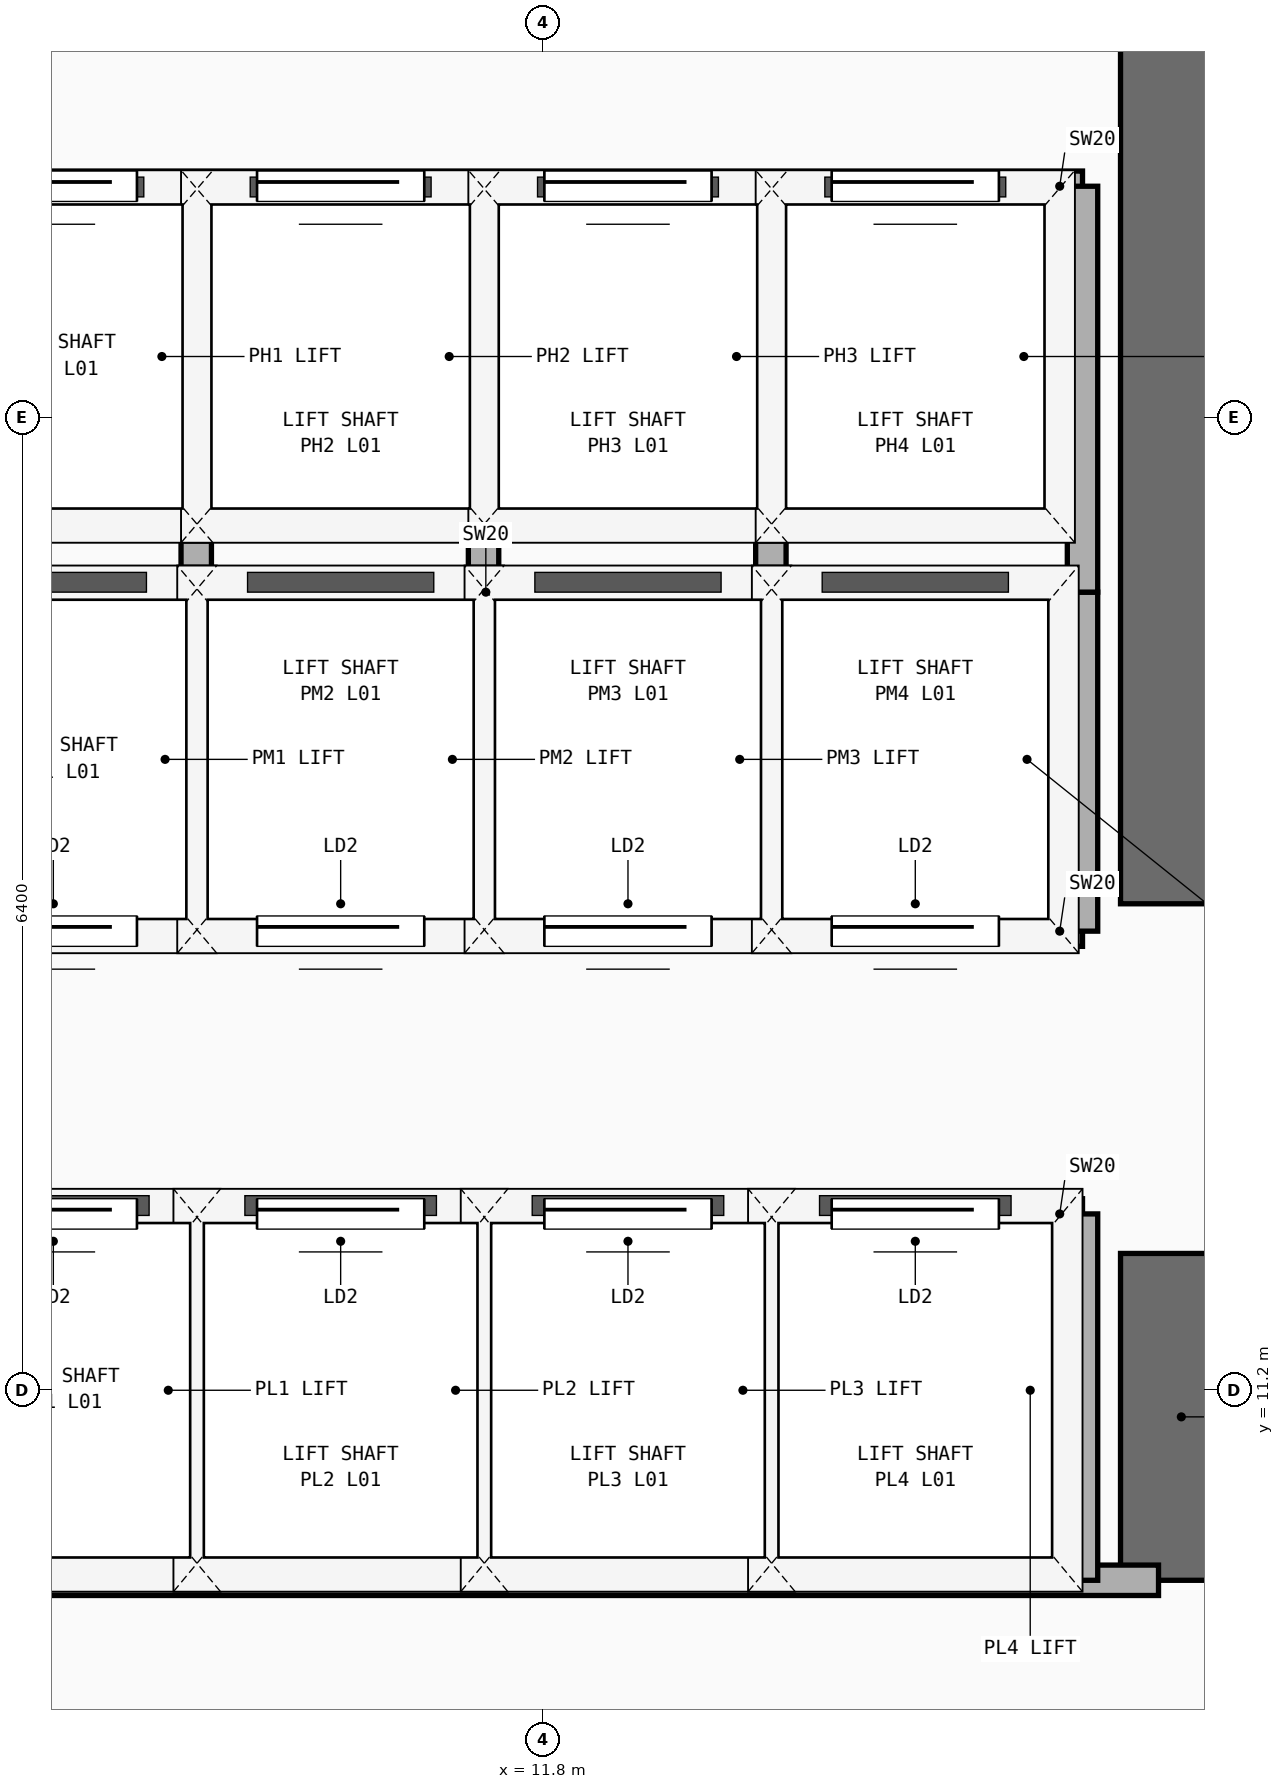
"""IFC4 building model, lengths in metres.
Left out: names, types, materials, properties, quantities, classifications, styles, units other than length and angle.
Written with IfcOpenShell. Run it as: python <this file> out.ifc"""

import sys

from ifc_helpers import new_model, si_unit, direction, frame, frame_2d, origin, place, context, subcontext, project, spatial, rectangle, extrude, element, fill, save


model = new_model("IFC4")
c1 = context("Model", 3, precision=1e-05, world=origin(), true_north=direction((0.0, 1.0)))
c2 = subcontext(c1, "Body", "Model", "MODEL_VIEW")
j1 = project(units=[si_unit("LENGTHUNIT", "METRE"), si_unit("PLANEANGLEUNIT", "RADIAN")], contexts=[c1])
p1 = place(None, origin())
s1 = spatial("IfcSite", under=j1, at=p1, CompositionType="ELEMENT")
p2 = place(p1, origin())
s2 = spatial("IfcBuilding", under=s1, at=p2, CompositionType="ELEMENT")
p3 = place(p2, origin())
s3 = spatial("IfcBuildingStorey", under=s2, at=p3, CompositionType="ELEMENT", Elevation=0.0)
p4 = place(p3, frame((16.0, 9.95, 0.0), z_axis=(0.0, 0.0, 1.0), x_axis=(0.0, 1.0, 0.0)))
e1 = element("IfcWall", 1, at=p4, inside=s3, PredefinedType="SHEAR", context=c2, shape_type="SweptSolid", body=[
    extrude(rectangle(XDim=2.15, YDim=0.8, at=frame_2d((1.075, 0.0))), origin(), (0.0, 0.0, 1.0), 5.26),
])
p5 = place(p3, frame((16.0, 14.4, 0.0), z_axis=(0.0, 0.0, 1.0), x_axis=(0.0, 1.0, 0.0)))
e2 = element("IfcWall", 2, at=p5, inside=s3, PredefinedType="SHEAR", context=c2, shape_type="SweptSolid", body=[
    extrude(rectangle(XDim=9.1, YDim=0.8, at=frame_2d((4.55, 0.0))), origin(), (0.0, 0.0, 1.0), 5.26),
])
p6 = place(p3, frame((7.5, 9.95, 0.0), z_axis=(0.0, 0.0, 1.0), x_axis=(1.0, 0.0, 0.0)))
e3 = element("IfcWall", 3, at=p6, inside=s3, PredefinedType="PARTITIONING", context=c2, shape_type="SweptSolid", body=[
    extrude(rectangle(XDim=8.35, YDim=0.2, at=frame_2d((4.175, 0.0))), origin(), (0.0, 0.0, 1.0), 5.26),
])
p7 = place(p3, frame((7.5, 12.36, 0.0), z_axis=(0.0, 0.0, 1.0), x_axis=(1.0, 0.0, 0.0)))
e4 = element("IfcWall", 4, at=p7, inside=s3, PredefinedType="PARTITIONING", context=c2, shape_type="SweptSolid", body=[
    extrude(rectangle(XDim=7.85, YDim=0.2, at=frame_2d((3.925, 0.0))), origin(), (0.0, 0.0, 1.0), 5.26),
])
p8 = place(p7, frame((0.53, 0.0, 0.0)))
e5 = element("IfcOpeningElement", 5, at=p8, cuts=e4, PredefinedType="OPENING", context=c2, shape_type="SweptSolid", body=[
    extrude(rectangle(XDim=1.1, YDim=2.2, at=frame_2d((0.55, 1.1))), frame((0.0, 0.11, 0.0), z_axis=(0.0, -1.0, 0.0), x_axis=(1.0, 0.0, 0.0)), (0.0, 0.0, 1.0), 0.22),
])
p9 = place(p7, frame((2.42, 0.0, 0.0)))
e6 = element("IfcOpeningElement", 6, at=p9, cuts=e4, PredefinedType="OPENING", context=c2, shape_type="SweptSolid", body=[
    extrude(rectangle(XDim=1.1, YDim=2.2, at=frame_2d((0.55, 1.1))), frame((0.0, 0.11, 0.0), z_axis=(0.0, -1.0, 0.0), x_axis=(1.0, 0.0, 0.0)), (0.0, 0.0, 1.0), 0.22),
])
p10 = place(p7, frame((4.31, 0.0, 0.0)))
e7 = element("IfcOpeningElement", 7, at=p10, cuts=e4, PredefinedType="OPENING", context=c2, shape_type="SweptSolid", body=[
    extrude(rectangle(XDim=1.1, YDim=2.2, at=frame_2d((0.55, 1.1))), frame((0.0, 0.11, 0.0), z_axis=(0.0, -1.0, 0.0), x_axis=(1.0, 0.0, 0.0)), (0.0, 0.0, 1.0), 0.22),
])
p11 = place(p7, frame((6.2, 0.0, 0.0)))
e8 = element("IfcOpeningElement", 8, at=p11, cuts=e4, PredefinedType="OPENING", context=c2, shape_type="SweptSolid", body=[
    extrude(rectangle(XDim=1.1, YDim=2.2, at=frame_2d((0.55, 1.1))), frame((0.0, 0.11, 0.0), z_axis=(0.0, -1.0, 0.0), x_axis=(1.0, 0.0, 0.0)), (0.0, 0.0, 1.0), 0.22),
])
for number, where, z_axis, x_axis in (
    (9, (15.35, 9.95, 0.0), (0.0, 0.0, 1.0), (0.0, 1.0, 0.0)),
    (10, (9.52, 9.95, 0.0), (0.0, 0.0, 1.0), (0.0, 1.0, 0.0)),
    (11, (11.41, 9.95, 0.0), (0.0, 0.0, 1.0), (0.0, 1.0, 0.0)),
    (12, (13.3, 9.95, 0.0), (0.0, 0.0, 1.0), (0.0, 1.0, 0.0)),
):
    element("IfcWall", number, at=place(p3, frame(where, z_axis=z_axis, x_axis=x_axis)), inside=s3, PredefinedType="PARTITIONING", context=c2, shape_type="SweptSolid", body=[
        extrude(rectangle(XDim=2.41, YDim=0.2, at=frame_2d((1.205, 0.0))), origin(), (0.0, 0.0, 1.0), 5.26),
    ])
p12 = place(p3, frame((7.5, 14.22, 0.0), z_axis=(0.0, 0.0, 1.0), x_axis=(1.0, 0.0, 0.0)))
e13 = element("IfcWall", 13, at=p12, inside=s3, PredefinedType="PARTITIONING", context=c2, shape_type="SweptSolid", body=[
    extrude(rectangle(XDim=7.85, YDim=0.2, at=frame_2d((3.925, 0.0))), origin(), (0.0, 0.0, 1.0), 5.26),
])
p13 = place(p12, frame((0.53, 0.0, 0.0)))
e14 = element("IfcOpeningElement", 14, at=p13, cuts=e13, PredefinedType="OPENING", context=c2, shape_type="SweptSolid", body=[
    extrude(rectangle(XDim=1.1, YDim=2.2, at=frame_2d((0.55, 1.1))), frame((0.0, 0.11, 0.0), z_axis=(0.0, -1.0, 0.0), x_axis=(1.0, 0.0, 0.0)), (0.0, 0.0, 1.0), 0.22),
])
p14 = place(p12, frame((2.42, 0.0, 0.0)))
e15 = element("IfcOpeningElement", 15, at=p14, cuts=e13, PredefinedType="OPENING", context=c2, shape_type="SweptSolid", body=[
    extrude(rectangle(XDim=1.1, YDim=2.2, at=frame_2d((0.55, 1.1))), frame((0.0, 0.11, 0.0), z_axis=(0.0, -1.0, 0.0), x_axis=(1.0, 0.0, 0.0)), (0.0, 0.0, 1.0), 0.22),
])
p15 = place(p12, frame((4.31, 0.0, 0.0)))
e16 = element("IfcOpeningElement", 16, at=p15, cuts=e13, PredefinedType="OPENING", context=c2, shape_type="SweptSolid", body=[
    extrude(rectangle(XDim=1.1, YDim=2.2, at=frame_2d((0.55, 1.1))), frame((0.0, 0.11, 0.0), z_axis=(0.0, -1.0, 0.0), x_axis=(1.0, 0.0, 0.0)), (0.0, 0.0, 1.0), 0.22),
])
p16 = place(p12, frame((6.2, 0.0, 0.0)))
e17 = element("IfcOpeningElement", 17, at=p16, cuts=e13, PredefinedType="OPENING", context=c2, shape_type="SweptSolid", body=[
    extrude(rectangle(XDim=1.1, YDim=2.2, at=frame_2d((0.55, 1.1))), frame((0.0, 0.11, 0.0), z_axis=(0.0, -1.0, 0.0), x_axis=(1.0, 0.0, 0.0)), (0.0, 0.0, 1.0), 0.22),
])
p17 = place(p3, frame((7.5, 16.45, 0.0), z_axis=(0.0, 0.0, 1.0), x_axis=(1.0, 0.0, 0.0)))
e18 = element("IfcWall", 18, at=p17, inside=s3, PredefinedType="PARTITIONING", context=c2, shape_type="SweptSolid", body=[
    extrude(rectangle(XDim=7.85, YDim=0.2, at=frame_2d((3.925, 0.0))), origin(), (0.0, 0.0, 1.0), 5.26),
])
for number, where, z_axis, x_axis in (
    (19, (15.35, 14.22, 0.0), (0.0, 0.0, 1.0), (0.0, 1.0, 0.0)),
    (20, (9.52, 14.22, 0.0), (0.0, 0.0, 1.0), (0.0, 1.0, 0.0)),
    (21, (11.41, 14.22, 0.0), (0.0, 0.0, 1.0), (0.0, 1.0, 0.0)),
    (22, (13.3, 14.22, 0.0), (0.0, 0.0, 1.0), (0.0, 1.0, 0.0)),
):
    element("IfcWall", number, at=place(p3, frame(where, z_axis=z_axis, x_axis=x_axis)), inside=s3, PredefinedType="PARTITIONING", context=c2, shape_type="SweptSolid", body=[
        extrude(rectangle(XDim=2.23, YDim=0.2, at=frame_2d((1.115, 0.0))), origin(), (0.0, 0.0, 1.0), 5.26),
    ])
p18 = place(p3, frame((7.5, 19.12, 0.0), z_axis=(0.0, 0.0, 1.0), x_axis=(1.0, 0.0, 0.0)))
e23 = element("IfcWall", 23, at=p18, inside=s3, PredefinedType="PARTITIONING", context=c2, shape_type="SweptSolid", body=[
    extrude(rectangle(XDim=7.85, YDim=0.2, at=frame_2d((3.925, 0.0))), origin(), (0.0, 0.0, 1.0), 5.26),
])
p19 = place(p18, frame((0.53, 0.0, 0.0)))
e24 = element("IfcOpeningElement", 24, at=p19, cuts=e23, PredefinedType="OPENING", context=c2, shape_type="SweptSolid", body=[
    extrude(rectangle(XDim=1.1, YDim=2.2, at=frame_2d((0.55, 1.1))), frame((0.0, 0.11, 0.0), z_axis=(0.0, -1.0, 0.0), x_axis=(1.0, 0.0, 0.0)), (0.0, 0.0, 1.0), 0.22),
])
p20 = place(p18, frame((2.42, 0.0, 0.0)))
e25 = element("IfcOpeningElement", 25, at=p20, cuts=e23, PredefinedType="OPENING", context=c2, shape_type="SweptSolid", body=[
    extrude(rectangle(XDim=1.1, YDim=2.2, at=frame_2d((0.55, 1.1))), frame((0.0, 0.11, 0.0), z_axis=(0.0, -1.0, 0.0), x_axis=(1.0, 0.0, 0.0)), (0.0, 0.0, 1.0), 0.22),
])
p21 = place(p18, frame((4.31, 0.0, 0.0)))
e26 = element("IfcOpeningElement", 26, at=p21, cuts=e23, PredefinedType="OPENING", context=c2, shape_type="SweptSolid", body=[
    extrude(rectangle(XDim=1.1, YDim=2.2, at=frame_2d((0.55, 1.1))), frame((0.0, 0.11, 0.0), z_axis=(0.0, -1.0, 0.0), x_axis=(1.0, 0.0, 0.0)), (0.0, 0.0, 1.0), 0.22),
])
p22 = place(p18, frame((6.2, 0.0, 0.0)))
e27 = element("IfcOpeningElement", 27, at=p22, cuts=e23, PredefinedType="OPENING", context=c2, shape_type="SweptSolid", body=[
    extrude(rectangle(XDim=1.1, YDim=2.2, at=frame_2d((0.55, 1.1))), frame((0.0, 0.11, 0.0), z_axis=(0.0, -1.0, 0.0), x_axis=(1.0, 0.0, 0.0)), (0.0, 0.0, 1.0), 0.22),
])
for number, where, z_axis, x_axis in (
    (28, (15.35, 16.45, 0.0), (0.0, 0.0, 1.0), (0.0, 1.0, 0.0)),
    (29, (9.52, 16.45, 0.0), (0.0, 0.0, 1.0), (0.0, 1.0, 0.0)),
    (30, (11.41, 16.45, 0.0), (0.0, 0.0, 1.0), (0.0, 1.0, 0.0)),
    (31, (13.3, 16.45, 0.0), (0.0, 0.0, 1.0), (0.0, 1.0, 0.0)),
):
    element("IfcWall", number, at=place(p3, frame(where, z_axis=z_axis, x_axis=x_axis)), inside=s3, PredefinedType="PARTITIONING", context=c2, shape_type="SweptSolid", body=[
        extrude(rectangle(XDim=2.67, YDim=0.2, at=frame_2d((1.335, 0.0))), origin(), (0.0, 0.0, 1.0), 5.26),
    ])
p23 = place(p8, origin())
e32 = element("IfcDoor", 32, at=p23, inside=s3, OperationType="SLIDING_TO_LEFT", PredefinedType="DOOR", context=c2, shape_type="SweptSolid", body=[
    extrude(rectangle(XDim=1.1, YDim=2.2, at=frame_2d((0.55, 1.1))), frame((0.0, 0.025, 0.0), z_axis=(0.0, -1.0, 0.0), x_axis=(1.0, 0.0, 0.0)), (0.0, 0.0, 1.0), 0.05),
])
fill(e5, e32)
p24 = place(p9, origin())
e33 = element("IfcDoor", 33, at=p24, inside=s3, OperationType="SLIDING_TO_LEFT", PredefinedType="DOOR", context=c2, shape_type="SweptSolid", body=[
    extrude(rectangle(XDim=1.1, YDim=2.2, at=frame_2d((0.55, 1.1))), frame((0.0, 0.025, 0.0), z_axis=(0.0, -1.0, 0.0), x_axis=(1.0, 0.0, 0.0)), (0.0, 0.0, 1.0), 0.05),
])
fill(e6, e33)
p25 = place(p10, origin())
e34 = element("IfcDoor", 34, at=p25, inside=s3, OperationType="SLIDING_TO_LEFT", PredefinedType="DOOR", context=c2, shape_type="SweptSolid", body=[
    extrude(rectangle(XDim=1.1, YDim=2.2, at=frame_2d((0.55, 1.1))), frame((0.0, 0.025, 0.0), z_axis=(0.0, -1.0, 0.0), x_axis=(1.0, 0.0, 0.0)), (0.0, 0.0, 1.0), 0.05),
])
fill(e7, e34)
p26 = place(p11, origin())
e35 = element("IfcDoor", 35, at=p26, inside=s3, OperationType="SLIDING_TO_LEFT", PredefinedType="DOOR", context=c2, shape_type="SweptSolid", body=[
    extrude(rectangle(XDim=1.1, YDim=2.2, at=frame_2d((0.55, 1.1))), frame((0.0, 0.025, 0.0), z_axis=(0.0, -1.0, 0.0), x_axis=(1.0, 0.0, 0.0)), (0.0, 0.0, 1.0), 0.05),
])
fill(e8, e35)
p27 = place(p13, frame((1.1, 0.0, 0.0), z_axis=(0.0, 0.0, 1.0), x_axis=(-1.0, 0.0, 0.0)))
e36 = element("IfcDoor", 36, at=p27, inside=s3, OperationType="SLIDING_TO_LEFT", PredefinedType="DOOR", context=c2, shape_type="SweptSolid", body=[
    extrude(rectangle(XDim=1.1, YDim=2.2, at=frame_2d((0.55, 1.1))), frame((0.0, 0.025, 0.0), z_axis=(0.0, -1.0, 0.0), x_axis=(1.0, 0.0, 0.0)), (0.0, 0.0, 1.0), 0.05),
])
fill(e14, e36)
p28 = place(p14, frame((1.1, 0.0, 0.0), z_axis=(0.0, 0.0, 1.0), x_axis=(-1.0, 0.0, 0.0)))
e37 = element("IfcDoor", 37, at=p28, inside=s3, OperationType="SLIDING_TO_LEFT", PredefinedType="DOOR", context=c2, shape_type="SweptSolid", body=[
    extrude(rectangle(XDim=1.1, YDim=2.2, at=frame_2d((0.55, 1.1))), frame((0.0, 0.025, 0.0), z_axis=(0.0, -1.0, 0.0), x_axis=(1.0, 0.0, 0.0)), (0.0, 0.0, 1.0), 0.05),
])
fill(e15, e37)
p29 = place(p15, frame((1.1, 0.0, 0.0), z_axis=(0.0, 0.0, 1.0), x_axis=(-1.0, 0.0, 0.0)))
e38 = element("IfcDoor", 38, at=p29, inside=s3, OperationType="SLIDING_TO_LEFT", PredefinedType="DOOR", context=c2, shape_type="SweptSolid", body=[
    extrude(rectangle(XDim=1.1, YDim=2.2, at=frame_2d((0.55, 1.1))), frame((0.0, 0.025, 0.0), z_axis=(0.0, -1.0, 0.0), x_axis=(1.0, 0.0, 0.0)), (0.0, 0.0, 1.0), 0.05),
])
fill(e16, e38)
p30 = place(p16, frame((1.1, 0.0, 0.0), z_axis=(0.0, 0.0, 1.0), x_axis=(-1.0, 0.0, 0.0)))
e39 = element("IfcDoor", 39, at=p30, inside=s3, OperationType="SLIDING_TO_LEFT", PredefinedType="DOOR", context=c2, shape_type="SweptSolid", body=[
    extrude(rectangle(XDim=1.1, YDim=2.2, at=frame_2d((0.55, 1.1))), frame((0.0, 0.025, 0.0), z_axis=(0.0, -1.0, 0.0), x_axis=(1.0, 0.0, 0.0)), (0.0, 0.0, 1.0), 0.05),
])
fill(e17, e39)
p31 = place(p19, origin())
e40 = element("IfcDoor", 40, at=p31, inside=s3, OperationType="SLIDING_TO_LEFT", PredefinedType="DOOR", context=c2, shape_type="SweptSolid", body=[
    extrude(rectangle(XDim=1.1, YDim=2.2, at=frame_2d((0.55, 1.1))), frame((0.0, 0.025, 0.0), z_axis=(0.0, -1.0, 0.0), x_axis=(1.0, 0.0, 0.0)), (0.0, 0.0, 1.0), 0.05),
])
fill(e24, e40)
p32 = place(p20, origin())
e41 = element("IfcDoor", 41, at=p32, inside=s3, OperationType="SLIDING_TO_LEFT", PredefinedType="DOOR", context=c2, shape_type="SweptSolid", body=[
    extrude(rectangle(XDim=1.1, YDim=2.2, at=frame_2d((0.55, 1.1))), frame((0.0, 0.025, 0.0), z_axis=(0.0, -1.0, 0.0), x_axis=(1.0, 0.0, 0.0)), (0.0, 0.0, 1.0), 0.05),
])
fill(e25, e41)
p33 = place(p21, origin())
e42 = element("IfcDoor", 42, at=p33, inside=s3, OperationType="SLIDING_TO_LEFT", PredefinedType="DOOR", context=c2, shape_type="SweptSolid", body=[
    extrude(rectangle(XDim=1.1, YDim=2.2, at=frame_2d((0.55, 1.1))), frame((0.0, 0.025, 0.0), z_axis=(0.0, -1.0, 0.0), x_axis=(1.0, 0.0, 0.0)), (0.0, 0.0, 1.0), 0.05),
])
fill(e26, e42)
p34 = place(p22, origin())
e43 = element("IfcDoor", 43, at=p34, inside=s3, OperationType="SLIDING_TO_LEFT", PredefinedType="DOOR", context=c2, shape_type="SweptSolid", body=[
    extrude(rectangle(XDim=1.1, YDim=2.2, at=frame_2d((0.55, 1.1))), frame((0.0, 0.025, 0.0), z_axis=(0.0, -1.0, 0.0), x_axis=(1.0, 0.0, 0.0)), (0.0, 0.0, 1.0), 0.05),
])
fill(e27, e43)
save(model, sys.argv[1])
